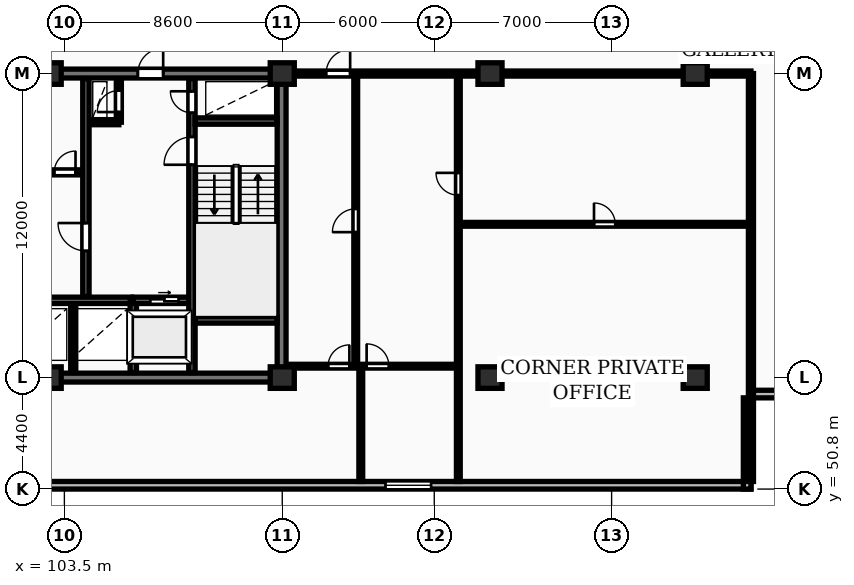
"""IFC4 building model, lengths in metres.
Left out: names, types, materials, properties, quantities, classifications, styles, units other than length and angle.
Written with IfcOpenShell. Run it as: python <this file> out.ifc"""

import sys

from ifc_helpers import new_model, si_unit, direction, frame, frame_2d, origin, origin_2d, place, context, subcontext, project, spatial, rectangle, extrude, element, fill, save


model = new_model("IFC4")
c1 = context("Model", 3, precision=1e-05, world=origin(), true_north=direction((0.0, 1.0)))
c2 = subcontext(c1, "Body", "Model", "MODEL_VIEW")
j1 = project(units=[si_unit("LENGTHUNIT", "METRE"), si_unit("PLANEANGLEUNIT", "RADIAN")], contexts=[c1])
p1 = place(None, origin())
s1 = spatial("IfcSite", under=j1, at=p1, CompositionType="ELEMENT")
p2 = place(p1, origin())
s2 = spatial("IfcBuilding", under=s1, at=p2, CompositionType="ELEMENT")
p3 = place(p2, frame((0.0, 0.0, 119.8)))
s3 = spatial("IfcBuildingStorey", under=s2, at=p3, CompositionType="ELEMENT", Elevation=119.8)
for number, where, z_axis, x_axis in (
    (1, (102.9, 55.2, 0.0), (0.0, 0.0, 1.0), (1.0, 0.0, 0.0)),
    (2, (102.9, 67.2, 0.0), (0.0, 0.0, 1.0), (1.0, 0.0, 0.0)),
    (3, (112.1, 55.2, 0.0), (0.0, 0.0, 1.0), (1.0, 0.0, 0.0)),
    (4, (112.1, 67.2, 0.0), (0.0, 0.0, 1.0), (1.0, 0.0, 0.0)),
    (5, (120.3, 55.2, 0.0), (0.0, 0.0, 1.0), (1.0, 0.0, 0.0)),
    (6, (120.3, 67.2, 0.0), (0.0, 0.0, 1.0), (1.0, 0.0, 0.0)),
    (7, (128.4, 55.2, 0.0), (0.0, 0.0, 1.0), (1.0, 0.0, 0.0)),
    (8, (128.4, 67.2, 0.0), (0.0, 0.0, 1.0), (1.0, 0.0, 0.0)),
):
    element("IfcColumn", number, at=place(p3, frame(where, z_axis=z_axis, x_axis=x_axis)), inside=s3, PredefinedType="COLUMN", context=c2, shape_type="SweptSolid", body=[
        extrude(rectangle(XDim=0.95, YDim=0.85, at=origin_2d()), origin(), (0.0, 0.0, 1.0), 3.25),
    ])
p4 = place(p3, frame((57.6, 50.95, 0.0), z_axis=(0.0, 0.0, 1.0), x_axis=(1.0, 0.0, 0.0)))
e9 = element("IfcWall", 9, at=p4, inside=s3, PredefinedType="STANDARD", context=c2, shape_type="SweptSolid", body=[
    extrude(rectangle(XDim=73.0, YDim=0.3, at=frame_2d((36.5, 0.0))), origin(), (0.0, 0.0, 1.0), 2.97),
])
p5 = place(p4, frame((15.225, 0.0, 0.85)))
e10 = element("IfcOpeningElement", 10, at=p5, cuts=e9, PredefinedType="OPENING", context=c2, shape_type="SweptSolid", body=[
    extrude(rectangle(XDim=1.8, YDim=1.8, at=frame_2d((0.9, 0.9))), frame((0.0, 0.16, 0.0), z_axis=(0.0, -1.0, 0.0), x_axis=(1.0, 0.0, 0.0)), (0.0, 0.0, 1.0), 0.32),
])
p6 = place(p4, frame((58.575, 0.0, 0.85)))
e11 = element("IfcOpeningElement", 11, at=p6, cuts=e9, PredefinedType="OPENING", context=c2, shape_type="SweptSolid", body=[
    extrude(rectangle(XDim=1.8, YDim=1.8, at=frame_2d((0.9, 0.9))), frame((0.0, 0.16, 0.0), z_axis=(0.0, -1.0, 0.0), x_axis=(1.0, 0.0, 0.0)), (0.0, 0.0, 1.0), 0.32),
])
for number, where, z_axis, x_axis in (
    (12, (130.45, 50.8, 0.0), (0.0, 0.0, 1.0), (0.0, 1.0, 0.0)),
    (13, (130.6, 54.55, 0.0), (0.0, 0.0, 1.0), (1.0, 0.0, 0.0)),
):
    element("IfcWall", number, at=place(p3, frame(where, z_axis=z_axis, x_axis=x_axis)), inside=s3, PredefinedType="STANDARD", context=c2, shape_type="SweptSolid", body=[
        extrude(rectangle(XDim=3.6, YDim=0.3, at=frame_2d((1.8, 0.0))), origin(), (0.0, 0.0, 1.0), 2.97),
    ])
p7 = place(p3, frame((75.95, 55.2, 0.0), z_axis=(0.0, 0.0, 1.0), x_axis=(1.0, 0.0, 0.0)))
e14 = element("IfcWall", 14, at=p7, inside=s3, PredefinedType="SHEAR", context=c2, shape_type="SweptSolid", body=[
    extrude(rectangle(XDim=36.3, YDim=0.35, at=frame_2d((18.15, 0.0))), origin(), (0.0, 0.0, 1.0), 3.25),
])
p8 = place(p3, frame((112.075, 55.375, 0.0), z_axis=(0.0, 0.0, 1.0), x_axis=(0.0, 1.0, 0.0)))
e15 = element("IfcWall", 15, at=p8, inside=s3, PredefinedType="SHEAR", context=c2, shape_type="SweptSolid", body=[
    extrude(rectangle(XDim=11.65, YDim=0.35, at=frame_2d((5.825, 0.0))), origin(), (0.0, 0.0, 1.0), 3.25),
])
p9 = place(p3, frame((75.95, 67.2, 0.0), z_axis=(0.0, 0.0, 1.0), x_axis=(1.0, 0.0, 0.0)))
e16 = element("IfcWall", 16, at=p9, inside=s3, PredefinedType="SHEAR", context=c2, shape_type="SweptSolid", body=[
    extrude(rectangle(XDim=36.3, YDim=0.35, at=frame_2d((18.15, 0.0))), origin(), (0.0, 0.0, 1.0), 3.25),
])
p10 = place(p9, frame((5.25, 0.0, 0.0)))
e17 = element("IfcOpeningElement", 17, at=p10, cuts=e16, PredefinedType="OPENING", context=c2, shape_type="SweptSolid", body=[
    extrude(rectangle(XDim=1.0, YDim=2.15, at=frame_2d((0.5, 1.075))), frame((0.0, 0.185, 0.0), z_axis=(0.0, -1.0, 0.0), x_axis=(1.0, 0.0, 0.0)), (0.0, 0.0, 1.0), 0.37),
])
p11 = place(p9, frame((21.6, 0.0, 0.0)))
e18 = element("IfcOpeningElement", 18, at=p11, cuts=e16, PredefinedType="OPENING", context=c2, shape_type="SweptSolid", body=[
    extrude(rectangle(XDim=1.5, YDim=2.2, at=frame_2d((0.75, 1.1))), frame((0.0, 0.185, 0.0), z_axis=(0.0, -1.0, 0.0), x_axis=(1.0, 0.0, 0.0)), (0.0, 0.0, 1.0), 0.37),
])
p12 = place(p9, frame((30.45, 0.0, 0.0)))
e19 = element("IfcOpeningElement", 19, at=p12, cuts=e16, PredefinedType="OPENING", context=c2, shape_type="SweptSolid", body=[
    extrude(rectangle(XDim=1.0, YDim=2.15, at=frame_2d((0.5, 1.075))), frame((0.0, 0.185, 0.0), z_axis=(0.0, -1.0, 0.0), x_axis=(1.0, 0.0, 0.0)), (0.0, 0.0, 1.0), 0.37),
])
p13 = place(p3, frame((103.85, 55.4, 0.0), z_axis=(0.0, 0.0, 1.0), x_axis=(0.0, 1.0, 0.0)))
e20 = element("IfcWall", 20, at=p13, inside=s3, PredefinedType="PARTITIONING", context=c2, shape_type="SweptSolid", body=[
    extrude(rectangle(XDim=2.72, YDim=0.2, at=frame_2d((1.36, 0.0))), origin(), (0.0, 0.0, 1.0), 2.97),
])
p14 = place(p3, frame((101.55, 58.25, 0.0), z_axis=(0.0, 0.0, 1.0), x_axis=(1.0, 0.0, 0.0)))
e21 = element("IfcWall", 21, at=p14, inside=s3, PredefinedType="SHEAR", context=c2, shape_type="SweptSolid", body=[
    extrude(rectangle(XDim=4.6, YDim=0.25, at=frame_2d((2.3, 0.0))), origin(), (0.0, 0.0, 1.0), 3.25),
])
p15 = place(p3, frame((106.22, 55.4, 0.0), z_axis=(0.0, 0.0, 1.0), x_axis=(0.0, 1.0, 0.0)))
e22 = element("IfcWall", 22, at=p15, inside=s3, PredefinedType="SHEAR", context=c2, shape_type="SweptSolid", body=[
    extrude(rectangle(XDim=2.85, YDim=0.25, at=frame_2d((1.425, 0.0))), origin(), (0.0, 0.0, 1.0), 3.25),
])
p16 = place(p3, frame((106.22, 58.25, 0.0), z_axis=(0.0, 0.0, 1.0), x_axis=(1.0, 0.0, 0.0)))
e23 = element("IfcWall", 23, at=p16, inside=s3, PredefinedType="SHEAR", context=c2, shape_type="SweptSolid", body=[
    extrude(rectangle(XDim=2.46, YDim=0.25, at=frame_2d((1.23, 0.0))), origin(), (0.0, 0.0, 1.0), 3.25),
])
p17 = place(p16, frame((0.67, 0.0, 0.0)))
e24 = element("IfcOpeningElement", 24, at=p17, cuts=e23, PredefinedType="OPENING", context=c2, shape_type="SweptSolid", body=[
    extrude(rectangle(XDim=1.12, YDim=2.12, at=frame_2d((0.56, 1.06))), frame((0.0, 0.135, 0.0), z_axis=(0.0, -1.0, 0.0), x_axis=(1.0, 0.0, 0.0)), (0.0, 0.0, 1.0), 0.27),
])
p18 = place(p3, frame((84.42, 63.3, 0.0), z_axis=(0.0, 0.0, 1.0), x_axis=(1.0, 0.0, 0.0)))
e25 = element("IfcWall", 25, at=p18, inside=s3, PredefinedType="PARTITIONING", context=c2, shape_type="SweptSolid", body=[
    extrude(rectangle(XDim=19.83, YDim=0.2, at=frame_2d((9.915, 0.0))), origin(), (0.0, 0.0, 1.0), 2.97),
])
p19 = place(p18, frame((1.15, 0.0, 0.0)))
e26 = element("IfcOpeningElement", 26, at=p19, cuts=e25, PredefinedType="OPENING", context=c2, shape_type="SweptSolid", body=[
    extrude(rectangle(XDim=0.85, YDim=2.05, at=frame_2d((0.425, 1.025))), frame((0.0, 0.11, 0.0), z_axis=(0.0, -1.0, 0.0), x_axis=(1.0, 0.0, 0.0)), (0.0, 0.0, 1.0), 0.22),
])
p20 = place(p18, frame((3.25, 0.0, 0.0)))
e27 = element("IfcOpeningElement", 27, at=p20, cuts=e25, PredefinedType="OPENING", context=c2, shape_type="SweptSolid", body=[
    extrude(rectangle(XDim=0.85, YDim=2.05, at=frame_2d((0.425, 1.025))), frame((0.0, 0.11, 0.0), z_axis=(0.0, -1.0, 0.0), x_axis=(1.0, 0.0, 0.0)), (0.0, 0.0, 1.0), 0.22),
])
p21 = place(p18, frame((13.08, 0.0, 0.0)))
e28 = element("IfcOpeningElement", 28, at=p21, cuts=e25, PredefinedType="OPENING", context=c2, shape_type="SweptSolid", body=[
    extrude(rectangle(XDim=1.5, YDim=2.2, at=frame_2d((0.75, 1.1))), frame((0.0, 0.11, 0.0), z_axis=(0.0, -1.0, 0.0), x_axis=(1.0, 0.0, 0.0)), (0.0, 0.0, 1.0), 0.22),
])
p22 = place(p18, frame((5.53, 0.0, 0.0)))
e29 = element("IfcOpeningElement", 29, at=p22, cuts=e25, PredefinedType="OPENING", context=c2, shape_type="SweptSolid", body=[
    extrude(rectangle(XDim=0.88, YDim=2.06, at=frame_2d((0.44, 1.03))), frame((0.0, 0.11, 0.0), z_axis=(0.0, -1.0, 0.0), x_axis=(1.0, 0.0, 0.0)), (0.0, 0.0, 1.0), 0.22),
])
p23 = place(p18, frame((7.68, 0.0, 0.0)))
e30 = element("IfcOpeningElement", 30, at=p23, cuts=e25, PredefinedType="OPENING", context=c2, shape_type="SweptSolid", body=[
    extrude(rectangle(XDim=0.88, YDim=2.06, at=frame_2d((0.44, 1.03))), frame((0.0, 0.11, 0.0), z_axis=(0.0, -1.0, 0.0), x_axis=(1.0, 0.0, 0.0)), (0.0, 0.0, 1.0), 0.22),
])
p24 = place(p18, frame((10.43, 0.0, 0.0)))
e31 = element("IfcOpeningElement", 31, at=p24, cuts=e25, PredefinedType="OPENING", context=c2, shape_type="SweptSolid", body=[
    extrude(rectangle(XDim=0.85, YDim=2.05, at=frame_2d((0.425, 1.025))), frame((0.0, 0.11, 0.0), z_axis=(0.0, -1.0, 0.0), x_axis=(1.0, 0.0, 0.0)), (0.0, 0.0, 1.0), 0.22),
])
p25 = place(p18, frame((16.23, 0.0, 0.0)))
e32 = element("IfcOpeningElement", 32, at=p25, cuts=e25, PredefinedType="OPENING", context=c2, shape_type="SweptSolid", body=[
    extrude(rectangle(XDim=0.96, YDim=2.1, at=frame_2d((0.48, 1.05))), frame((0.0, 0.11, 0.0), z_axis=(0.0, -1.0, 0.0), x_axis=(1.0, 0.0, 0.0)), (0.0, 0.0, 1.0), 0.22),
])
p26 = place(p18, frame((18.68, 0.0, 0.0)))
e33 = element("IfcOpeningElement", 33, at=p26, cuts=e25, PredefinedType="OPENING", context=c2, shape_type="SweptSolid", body=[
    extrude(rectangle(XDim=0.84, YDim=2.04, at=frame_2d((0.42, 1.02))), frame((0.0, 0.11, 0.0), z_axis=(0.0, -1.0, 0.0), x_axis=(1.0, 0.0, 0.0)), (0.0, 0.0, 1.0), 0.22),
])
p27 = place(p3, frame((104.45, 65.28, 0.0), z_axis=(0.0, 0.0, 1.0), x_axis=(1.0, 0.0, 0.0)))
e34 = element("IfcWall", 34, at=p27, inside=s3, PredefinedType="PARTITIONING", context=c2, shape_type="SweptSolid", body=[
    extrude(rectangle(XDim=1.2, YDim=0.2, at=frame_2d((0.6, 0.0))), origin(), (0.0, 0.0, 1.0), 2.97),
])
p28 = place(p3, frame((105.65, 65.28, 0.0), z_axis=(0.0, 0.0, 1.0), x_axis=(0.0, 1.0, 0.0)))
e35 = element("IfcWall", 35, at=p28, inside=s3, PredefinedType="PARTITIONING", context=c2, shape_type="SweptSolid", body=[
    extrude(rectangle(XDim=1.72, YDim=0.2, at=frame_2d((0.86, 0.0))), origin(), (0.0, 0.0, 1.0), 2.97),
])
p29 = place(p28, frame((0.4, 0.0, 0.0)))
e36 = element("IfcOpeningElement", 36, at=p29, cuts=e35, PredefinedType="OPENING", context=c2, shape_type="SweptSolid", body=[
    extrude(rectangle(XDim=0.85, YDim=2.05, at=frame_2d((0.425, 1.025))), frame((0.0, 0.11, 0.0), z_axis=(0.0, -1.0, 0.0), x_axis=(1.0, 0.0, 0.0)), (0.0, 0.0, 1.0), 0.22),
])
p30 = place(p3, frame((104.35, 58.4, 0.0), z_axis=(0.0, 0.0, 1.0), x_axis=(0.0, 1.0, 0.0)))
e37 = element("IfcWall", 37, at=p30, inside=s3, PredefinedType="SHEAR", context=c2, shape_type="SweptSolid", body=[
    extrude(rectangle(XDim=8.6, YDim=0.25, at=frame_2d((4.3, 0.0))), origin(), (0.0, 0.0, 1.0), 3.25),
])
p31 = place(p30, frame((1.8, 0.0, 0.0)))
e38 = element("IfcOpeningElement", 38, at=p31, cuts=e37, PredefinedType="OPENING", context=c2, shape_type="SweptSolid", body=[
    extrude(rectangle(XDim=1.1, YDim=2.1, at=frame_2d((0.55, 1.05))), frame((0.0, 0.135, 0.0), z_axis=(0.0, -1.0, 0.0), x_axis=(1.0, 0.0, 0.0)), (0.0, 0.0, 1.0), 0.27),
])
p32 = place(p3, frame((108.535, 55.4, 0.0), z_axis=(0.0, 0.0, 1.0), x_axis=(0.0, 1.0, 0.0)))
e39 = element("IfcWall", 39, at=p32, inside=s3, PredefinedType="SHEAR", context=c2, shape_type="SweptSolid", body=[
    extrude(rectangle(XDim=11.6, YDim=0.25, at=frame_2d((5.8, 0.0))), origin(), (0.0, 0.0, 1.0), 3.25),
])
p33 = place(p32, frame((8.2, 0.0, 0.0)))
e40 = element("IfcOpeningElement", 40, at=p33, cuts=e39, PredefinedType="OPENING", context=c2, shape_type="SweptSolid", body=[
    extrude(rectangle(XDim=1.1, YDim=2.1, at=frame_2d((0.55, 1.05))), frame((0.0, 0.135, 0.0), z_axis=(0.0, -1.0, 0.0), x_axis=(1.0, 0.0, 0.0)), (0.0, 0.0, 1.0), 0.27),
])
p34 = place(p32, frame((10.25, 0.0, 0.0)))
e41 = element("IfcOpeningElement", 41, at=p34, cuts=e39, PredefinedType="OPENING", context=c2, shape_type="SweptSolid", body=[
    extrude(rectangle(XDim=0.85, YDim=2.05, at=frame_2d((0.425, 1.025))), frame((0.0, 0.135, 0.0), z_axis=(0.0, -1.0, 0.0), x_axis=(1.0, 0.0, 0.0)), (0.0, 0.0, 1.0), 0.27),
])
for number, where, z_axis, x_axis in (
    (42, (108.66, 57.475, 0.0), (0.0, 0.0, 1.0), (1.0, 0.0, 0.0)),
    (43, (108.66, 65.325, 0.0), (0.0, 0.0, 1.0), (1.0, 0.0, 0.0)),
):
    element("IfcWall", number, at=place(p3, frame(where, z_axis=z_axis, x_axis=x_axis)), inside=s3, PredefinedType="SHEAR", context=c2, shape_type="SweptSolid", body=[
        extrude(rectangle(XDim=3.24, YDim=0.25, at=frame_2d((1.62, 0.0))), origin(), (0.0, 0.0, 1.0), 3.25),
    ])
p35 = place(p3, frame((130.6, 51.1, 0.0), z_axis=(0.0, 0.0, 1.0), x_axis=(0.0, 1.0, 0.0)))
e44 = element("IfcWall", 44, at=p35, inside=s3, PredefinedType="PARTITIONING", context=c2, shape_type="SweptSolid", body=[
    extrude(rectangle(XDim=16.1, YDim=0.2, at=frame_2d((8.05, 0.0))), origin(), (0.0, 0.0, 1.0), 2.97),
])
p36 = place(p3, frame((119.05, 61.25, 0.0), z_axis=(0.0, 0.0, 1.0), x_axis=(1.0, 0.0, 0.0)))
e45 = element("IfcWall", 45, at=p36, inside=s3, PredefinedType="PARTITIONING", context=c2, shape_type="SweptSolid", body=[
    extrude(rectangle(XDim=11.55, YDim=0.15, at=frame_2d((5.775, 0.0))), origin(), (0.0, 0.0, 1.0), 2.97),
])
p37 = place(p36, frame((5.355, 0.0, 0.0)))
e46 = element("IfcOpeningElement", 46, at=p37, cuts=e45, PredefinedType="OPENING", context=c2, shape_type="SweptSolid", body=[
    extrude(rectangle(XDim=0.84, YDim=2.04, at=frame_2d((0.42, 1.02))), frame((0.0, 0.085, 0.0), z_axis=(0.0, -1.0, 0.0), x_axis=(1.0, 0.0, 0.0)), (0.0, 0.0, 1.0), 0.17),
])
p38 = place(p3, frame((119.05, 51.1, 0.0), z_axis=(0.0, 0.0, 1.0), x_axis=(0.0, 1.0, 0.0)))
e47 = element("IfcWall", 47, at=p38, inside=s3, PredefinedType="PARTITIONING", context=c2, shape_type="SweptSolid", body=[
    extrude(rectangle(XDim=16.05, YDim=0.15, at=frame_2d((8.025, 0.0))), origin(), (0.0, 0.0, 1.0), 2.97),
])
p39 = place(p38, frame((11.3, 0.0, 0.0)))
e48 = element("IfcOpeningElement", 48, at=p39, cuts=e47, PredefinedType="OPENING", context=c2, shape_type="SweptSolid", body=[
    extrude(rectangle(XDim=0.88, YDim=2.06, at=frame_2d((0.44, 1.03))), frame((0.0, 0.085, 0.0), z_axis=(0.0, -1.0, 0.0), x_axis=(1.0, 0.0, 0.0)), (0.0, 0.0, 1.0), 0.17),
])
p40 = place(p3, frame((115.0, 55.65, 0.0), z_axis=(0.0, 0.0, 1.0), x_axis=(0.0, 1.0, 0.0)))
e49 = element("IfcWall", 49, at=p40, inside=s3, PredefinedType="PARTITIONING", context=c2, shape_type="SweptSolid", body=[
    extrude(rectangle(XDim=11.5, YDim=0.15, at=frame_2d((5.75, 0.0))), origin(), (0.0, 0.0, 1.0), 2.97),
])
p41 = place(p40, frame((5.29, 0.0, 0.0)))
e50 = element("IfcOpeningElement", 50, at=p41, cuts=e49, PredefinedType="OPENING", context=c2, shape_type="SweptSolid", body=[
    extrude(rectangle(XDim=0.92, YDim=2.08, at=frame_2d((0.46, 1.04))), frame((0.0, 0.085, 0.0), z_axis=(0.0, -1.0, 0.0), x_axis=(1.0, 0.0, 0.0)), (0.0, 0.0, 1.0), 0.17),
])
p42 = place(p3, frame((115.2, 51.1, 0.0), z_axis=(0.0, 0.0, 1.0), x_axis=(0.0, 1.0, 0.0)))
e51 = element("IfcWall", 51, at=p42, inside=s3, PredefinedType="PARTITIONING", context=c2, shape_type="SweptSolid", body=[
    extrude(rectangle(XDim=4.55, YDim=0.15, at=frame_2d((2.275, 0.0))), origin(), (0.0, 0.0, 1.0), 2.97),
])
p43 = place(p3, frame((112.27, 55.65, 0.0), z_axis=(0.0, 0.0, 1.0), x_axis=(1.0, 0.0, 0.0)))
e52 = element("IfcWall", 52, at=p43, inside=s3, PredefinedType="PARTITIONING", context=c2, shape_type="SweptSolid", body=[
    extrude(rectangle(XDim=6.76, YDim=0.15, at=frame_2d((3.38, 0.0))), origin(), (0.0, 0.0, 1.0), 2.97),
])
p44 = place(p43, frame((1.64, 0.0, 0.0)))
e53 = element("IfcOpeningElement", 53, at=p44, cuts=e52, PredefinedType="OPENING", context=c2, shape_type="SweptSolid", body=[
    extrude(rectangle(XDim=0.84, YDim=2.04, at=frame_2d((0.42, 1.02))), frame((0.0, 0.085, 0.0), z_axis=(0.0, -1.0, 0.0), x_axis=(1.0, 0.0, 0.0)), (0.0, 0.0, 1.0), 0.17),
])
p45 = place(p43, frame((3.16, 0.0, 0.0)))
e54 = element("IfcOpeningElement", 54, at=p45, cuts=e52, PredefinedType="OPENING", context=c2, shape_type="SweptSolid", body=[
    extrude(rectangle(XDim=0.88, YDim=2.06, at=frame_2d((0.44, 1.03))), frame((0.0, 0.085, 0.0), z_axis=(0.0, -1.0, 0.0), x_axis=(1.0, 0.0, 0.0)), (0.0, 0.0, 1.0), 0.17),
])
p46 = place(p3, frame((112.25, 67.2, 0.0), z_axis=(0.0, 0.0, 1.0), x_axis=(1.0, 0.0, 0.0)))
e55 = element("IfcWall", 55, at=p46, inside=s3, PredefinedType="PARTITIONING", context=c2, shape_type="SweptSolid", body=[
    extrude(rectangle(XDim=18.35, YDim=0.2, at=frame_2d((9.175, 0.0))), origin(), (0.0, 0.0, 1.0), 2.433),
])
p47 = place(p46, frame((1.58, 0.0, 0.0)))
e56 = element("IfcOpeningElement", 56, at=p47, cuts=e55, PredefinedType="OPENING", context=c2, shape_type="SweptSolid", body=[
    extrude(rectangle(XDim=0.95, YDim=2.15, at=frame_2d((0.475, 1.075))), frame((0.0, 0.11, 0.0), z_axis=(0.0, -1.0, 0.0), x_axis=(1.0, 0.0, 0.0)), (0.0, 0.0, 1.0), 0.22),
])
p48 = place(p6, origin())
e57 = element("IfcWindow", 57, at=p48, inside=s3, PartitioningType="SINGLE_PANEL", PredefinedType="WINDOW", context=c2, shape_type="SweptSolid", body=[
    extrude(rectangle(XDim=1.8, YDim=1.8, at=frame_2d((0.9, 0.9))), frame((0.0, 0.03, 0.0), z_axis=(0.0, -1.0, 0.0), x_axis=(1.0, 0.0, 0.0)), (0.0, 0.0, 1.0), 0.06),
])
fill(e11, e57)
p49 = place(p12, origin())
e58 = element("IfcDoor", 58, at=p49, inside=s3, OperationType="SINGLE_SWING_RIGHT", PredefinedType="DOOR", context=c2, shape_type="SweptSolid", body=[
    extrude(rectangle(XDim=1.0, YDim=2.15, at=frame_2d((0.5, 1.075))), frame((0.0, 0.025, 0.0), z_axis=(0.0, -1.0, 0.0), x_axis=(1.0, 0.0, 0.0)), (0.0, 0.0, 1.0), 0.05),
])
fill(e19, e58)
p50 = place(p17, origin())
e59 = element("IfcDoor", 59, at=p50, inside=s3, OperationType="SLIDING_TO_RIGHT", PredefinedType="DOOR", context=c2, shape_type="SweptSolid", body=[
    extrude(rectangle(XDim=1.12, YDim=2.12, at=frame_2d((0.56, 1.06))), frame((0.0, 0.025, 0.0), z_axis=(0.0, -1.0, 0.0), x_axis=(1.0, 0.0, 0.0)), (0.0, 0.0, 1.0), 0.05),
])
fill(e24, e59)
p51 = place(p26, origin())
e60 = element("IfcDoor", 60, at=p51, inside=s3, OperationType="SINGLE_SWING_RIGHT", PredefinedType="DOOR", context=c2, shape_type="SweptSolid", body=[
    extrude(rectangle(XDim=0.84, YDim=2.04, at=frame_2d((0.42, 1.02))), frame((0.0, 0.025, 0.0), z_axis=(0.0, -1.0, 0.0), x_axis=(1.0, 0.0, 0.0)), (0.0, 0.0, 1.0), 0.05),
])
fill(e33, e60)
p52 = place(p29, origin())
e61 = element("IfcDoor", 61, at=p52, inside=s3, OperationType="SINGLE_SWING_LEFT", PredefinedType="DOOR", context=c2, shape_type="SweptSolid", body=[
    extrude(rectangle(XDim=0.85, YDim=2.05, at=frame_2d((0.425, 1.025))), frame((0.0, 0.025, 0.0), z_axis=(0.0, -1.0, 0.0), x_axis=(1.0, 0.0, 0.0)), (0.0, 0.0, 1.0), 0.05),
])
fill(e36, e61)
p53 = place(p31, origin())
e62 = element("IfcDoor", 62, at=p53, inside=s3, OperationType="SINGLE_SWING_RIGHT", PredefinedType="DOOR", context=c2, shape_type="SweptSolid", body=[
    extrude(rectangle(XDim=1.1, YDim=2.1, at=frame_2d((0.55, 1.05))), frame((0.0, 0.025, 0.0), z_axis=(0.0, -1.0, 0.0), x_axis=(1.0, 0.0, 0.0)), (0.0, 0.0, 1.0), 0.05),
])
fill(e38, e62)
p54 = place(p33, origin())
e63 = element("IfcDoor", 63, at=p54, inside=s3, OperationType="SINGLE_SWING_LEFT", PredefinedType="DOOR", context=c2, shape_type="SweptSolid", body=[
    extrude(rectangle(XDim=1.1, YDim=2.1, at=frame_2d((0.55, 1.05))), frame((0.0, 0.025, 0.0), z_axis=(0.0, -1.0, 0.0), x_axis=(1.0, 0.0, 0.0)), (0.0, 0.0, 1.0), 0.05),
])
fill(e40, e63)
p55 = place(p34, origin())
e64 = element("IfcDoor", 64, at=p55, inside=s3, OperationType="SINGLE_SWING_RIGHT", PredefinedType="DOOR", context=c2, shape_type="SweptSolid", body=[
    extrude(rectangle(XDim=0.85, YDim=2.05, at=frame_2d((0.425, 1.025))), frame((0.0, 0.025, 0.0), z_axis=(0.0, -1.0, 0.0), x_axis=(1.0, 0.0, 0.0)), (0.0, 0.0, 1.0), 0.05),
])
fill(e41, e64)
p56 = place(p37, origin())
e65 = element("IfcDoor", 65, at=p56, inside=s3, OperationType="SINGLE_SWING_LEFT", PredefinedType="DOOR", context=c2, shape_type="SweptSolid", body=[
    extrude(rectangle(XDim=0.84, YDim=2.04, at=frame_2d((0.42, 1.02))), frame((0.0, 0.025, 0.0), z_axis=(0.0, -1.0, 0.0), x_axis=(1.0, 0.0, 0.0)), (0.0, 0.0, 1.0), 0.05),
])
fill(e46, e65)
p57 = place(p39, origin())
e66 = element("IfcDoor", 66, at=p57, inside=s3, OperationType="SINGLE_SWING_RIGHT", PredefinedType="DOOR", context=c2, shape_type="SweptSolid", body=[
    extrude(rectangle(XDim=0.88, YDim=2.06, at=frame_2d((0.44, 1.03))), frame((0.0, 0.025, 0.0), z_axis=(0.0, -1.0, 0.0), x_axis=(1.0, 0.0, 0.0)), (0.0, 0.0, 1.0), 0.05),
])
fill(e48, e66)
p58 = place(p41, origin())
e67 = element("IfcDoor", 67, at=p58, inside=s3, OperationType="SINGLE_SWING_LEFT", PredefinedType="DOOR", context=c2, shape_type="SweptSolid", body=[
    extrude(rectangle(XDim=0.92, YDim=2.08, at=frame_2d((0.46, 1.04))), frame((0.0, 0.025, 0.0), z_axis=(0.0, -1.0, 0.0), x_axis=(1.0, 0.0, 0.0)), (0.0, 0.0, 1.0), 0.05),
])
fill(e50, e67)
p59 = place(p44, origin())
e68 = element("IfcDoor", 68, at=p59, inside=s3, OperationType="SINGLE_SWING_RIGHT", PredefinedType="DOOR", context=c2, shape_type="SweptSolid", body=[
    extrude(rectangle(XDim=0.84, YDim=2.04, at=frame_2d((0.42, 1.02))), frame((0.0, 0.025, 0.0), z_axis=(0.0, -1.0, 0.0), x_axis=(1.0, 0.0, 0.0)), (0.0, 0.0, 1.0), 0.05),
])
fill(e53, e68)
p60 = place(p45, origin())
e69 = element("IfcDoor", 69, at=p60, inside=s3, OperationType="SINGLE_SWING_LEFT", PredefinedType="DOOR", context=c2, shape_type="SweptSolid", body=[
    extrude(rectangle(XDim=0.88, YDim=2.06, at=frame_2d((0.44, 1.03))), frame((0.0, 0.025, 0.0), z_axis=(0.0, -1.0, 0.0), x_axis=(1.0, 0.0, 0.0)), (0.0, 0.0, 1.0), 0.05),
])
fill(e54, e69)
p61 = place(p47, origin())
e70 = element("IfcDoor", 70, at=p61, inside=s3, OperationType="SINGLE_SWING_RIGHT", PredefinedType="DOOR", context=c2, shape_type="SweptSolid", body=[
    extrude(rectangle(XDim=0.95, YDim=2.15, at=frame_2d((0.475, 1.075))), frame((0.0, 0.025, 0.0), z_axis=(0.0, -1.0, 0.0), x_axis=(1.0, 0.0, 0.0)), (0.0, 0.0, 1.0), 0.05),
])
fill(e56, e70)
save(model, sys.argv[1])
